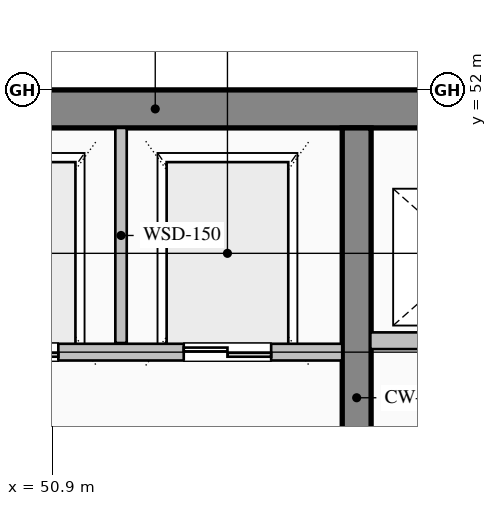
"""IFC4 building model, lengths in metres.
Left out: names, types, materials, properties, quantities, classifications, styles, units other than length and angle.
Written with IfcOpenShell. Run it as: python <this file> out.ifc"""

import sys

from ifc_helpers import new_model, si_unit, direction, frame, frame_2d, origin, place, context, subcontext, project, spatial, rectangle, extrude, element, fill, save


model = new_model("IFC4")
c1 = context("Model", 3, precision=1e-05, world=origin(), true_north=direction((0.0, 1.0)))
c2 = subcontext(c1, "Body", "Model", "MODEL_VIEW")
j1 = project(units=[si_unit("LENGTHUNIT", "METRE"), si_unit("PLANEANGLEUNIT", "RADIAN")], contexts=[c1])
p1 = place(None, origin())
s1 = spatial("IfcSite", under=j1, at=p1, CompositionType="ELEMENT")
p2 = place(p1, origin())
s2 = spatial("IfcBuilding", under=s1, at=p2, CompositionType="ELEMENT")
p3 = place(p2, frame((0.0, 0.0, 131.0)))
s3 = spatial("IfcBuildingStorey", under=s2, at=p3, CompositionType="ELEMENT", Elevation=131.0)
p4 = place(p3, frame((40.5, 51.75, 0.0), z_axis=(0.0, 0.0, 1.0), x_axis=(1.0, 0.0, 0.0)))
e1 = element("IfcWall", 1, at=p4, inside=s3, PredefinedType="SHEAR", context=c2, shape_type="SweptSolid", body=[
    extrude(rectangle(XDim=23.5, YDim=0.5, at=frame_2d((11.75, 0.0))), origin(), (0.0, 0.0, 1.0), 3.765),
])
p5 = place(p3, frame((54.9, 44.4, 0.0), z_axis=(0.0, 0.0, 1.0), x_axis=(0.0, 1.0, 0.0)))
e2 = element("IfcWall", 2, at=p5, inside=s3, PredefinedType="SHEAR", context=c2, shape_type="SweptSolid", body=[
    extrude(rectangle(XDim=7.1, YDim=0.38, at=frame_2d((3.55, 0.0))), origin(), (0.0, 0.0, 1.0), 3.765),
])
p6 = place(p3, frame((54.71, 48.55, 0.0), z_axis=(0.0, 0.0, 1.0), x_axis=(-1.0, 0.0, 0.0)))
e3 = element("IfcWall", 3, at=p6, inside=s3, PredefinedType="PARTITIONING", context=c2, shape_type="SweptSolid", body=[
    extrude(rectangle(XDim=5.12, YDim=0.22, at=frame_2d((2.56, 0.0))), origin(), (0.0, 0.0, 1.0), 3.765),
])
p7 = place(p6, frame((3.735, 0.0, 0.0)))
e4 = element("IfcOpeningElement", 4, at=p7, cuts=e3, PredefinedType="OPENING", context=c2, shape_type="SweptSolid", body=[
    extrude(rectangle(XDim=1.15, YDim=2.2, at=frame_2d((0.575, 1.1))), frame((0.0, 0.12, 0.0), z_axis=(0.0, -1.0, 0.0), x_axis=(1.0, 0.0, 0.0)), (0.0, 0.0, 1.0), 0.24),
])
p8 = place(p6, frame((0.935, 0.0, 0.0)))
e5 = element("IfcOpeningElement", 5, at=p8, cuts=e3, PredefinedType="OPENING", context=c2, shape_type="SweptSolid", body=[
    extrude(rectangle(XDim=1.15, YDim=2.2, at=frame_2d((0.575, 1.1))), frame((0.0, 0.12, 0.0), z_axis=(0.0, -1.0, 0.0), x_axis=(1.0, 0.0, 0.0)), (0.0, 0.0, 1.0), 0.24),
])
p9 = place(p3, frame((51.8, 48.67, 0.0), z_axis=(0.0, 0.0, 1.0), x_axis=(0.0, 1.0, 0.0)))
e6 = element("IfcWall", 6, at=p9, inside=s3, PredefinedType="PARTITIONING", context=c2, shape_type="SweptSolid", body=[
    extrude(rectangle(XDim=2.83, YDim=0.15, at=frame_2d((1.415, 0.0))), origin(), (0.0, 0.0, 1.0), 3.765),
])
p10 = place(p3, frame((63.32, 48.7, 0.0), z_axis=(0.0, 0.0, 1.0), x_axis=(-1.0, 0.0, 0.0)))
e7 = element("IfcWall", 7, at=p10, inside=s3, PredefinedType="PARTITIONING", context=c2, shape_type="SweptSolid", body=[
    extrude(rectangle(XDim=8.24, YDim=0.22, at=frame_2d((4.12, 0.0))), origin(), (0.0, 0.0, 1.0), 3.765),
])
p11 = place(p7, origin())
e8 = element("IfcDoor", 8, at=p11, inside=s3, OperationType="DOUBLE_DOOR_SLIDING", PredefinedType="DOOR", context=c2, shape_type="SweptSolid", body=[
    extrude(rectangle(XDim=1.15, YDim=2.2, at=frame_2d((0.575, 1.1))), frame((0.0, 0.025, 0.0), z_axis=(0.0, -1.0, 0.0), x_axis=(1.0, 0.0, 0.0)), (0.0, 0.0, 1.0), 0.05),
])
fill(e4, e8)
p12 = place(p8, origin())
e9 = element("IfcDoor", 9, at=p12, inside=s3, OperationType="DOUBLE_DOOR_SLIDING", PredefinedType="DOOR", context=c2, shape_type="SweptSolid", body=[
    extrude(rectangle(XDim=1.15, YDim=2.2, at=frame_2d((0.575, 1.1))), frame((0.0, 0.025, 0.0), z_axis=(0.0, -1.0, 0.0), x_axis=(1.0, 0.0, 0.0)), (0.0, 0.0, 1.0), 0.05),
])
fill(e5, e9)
save(model, sys.argv[1])
